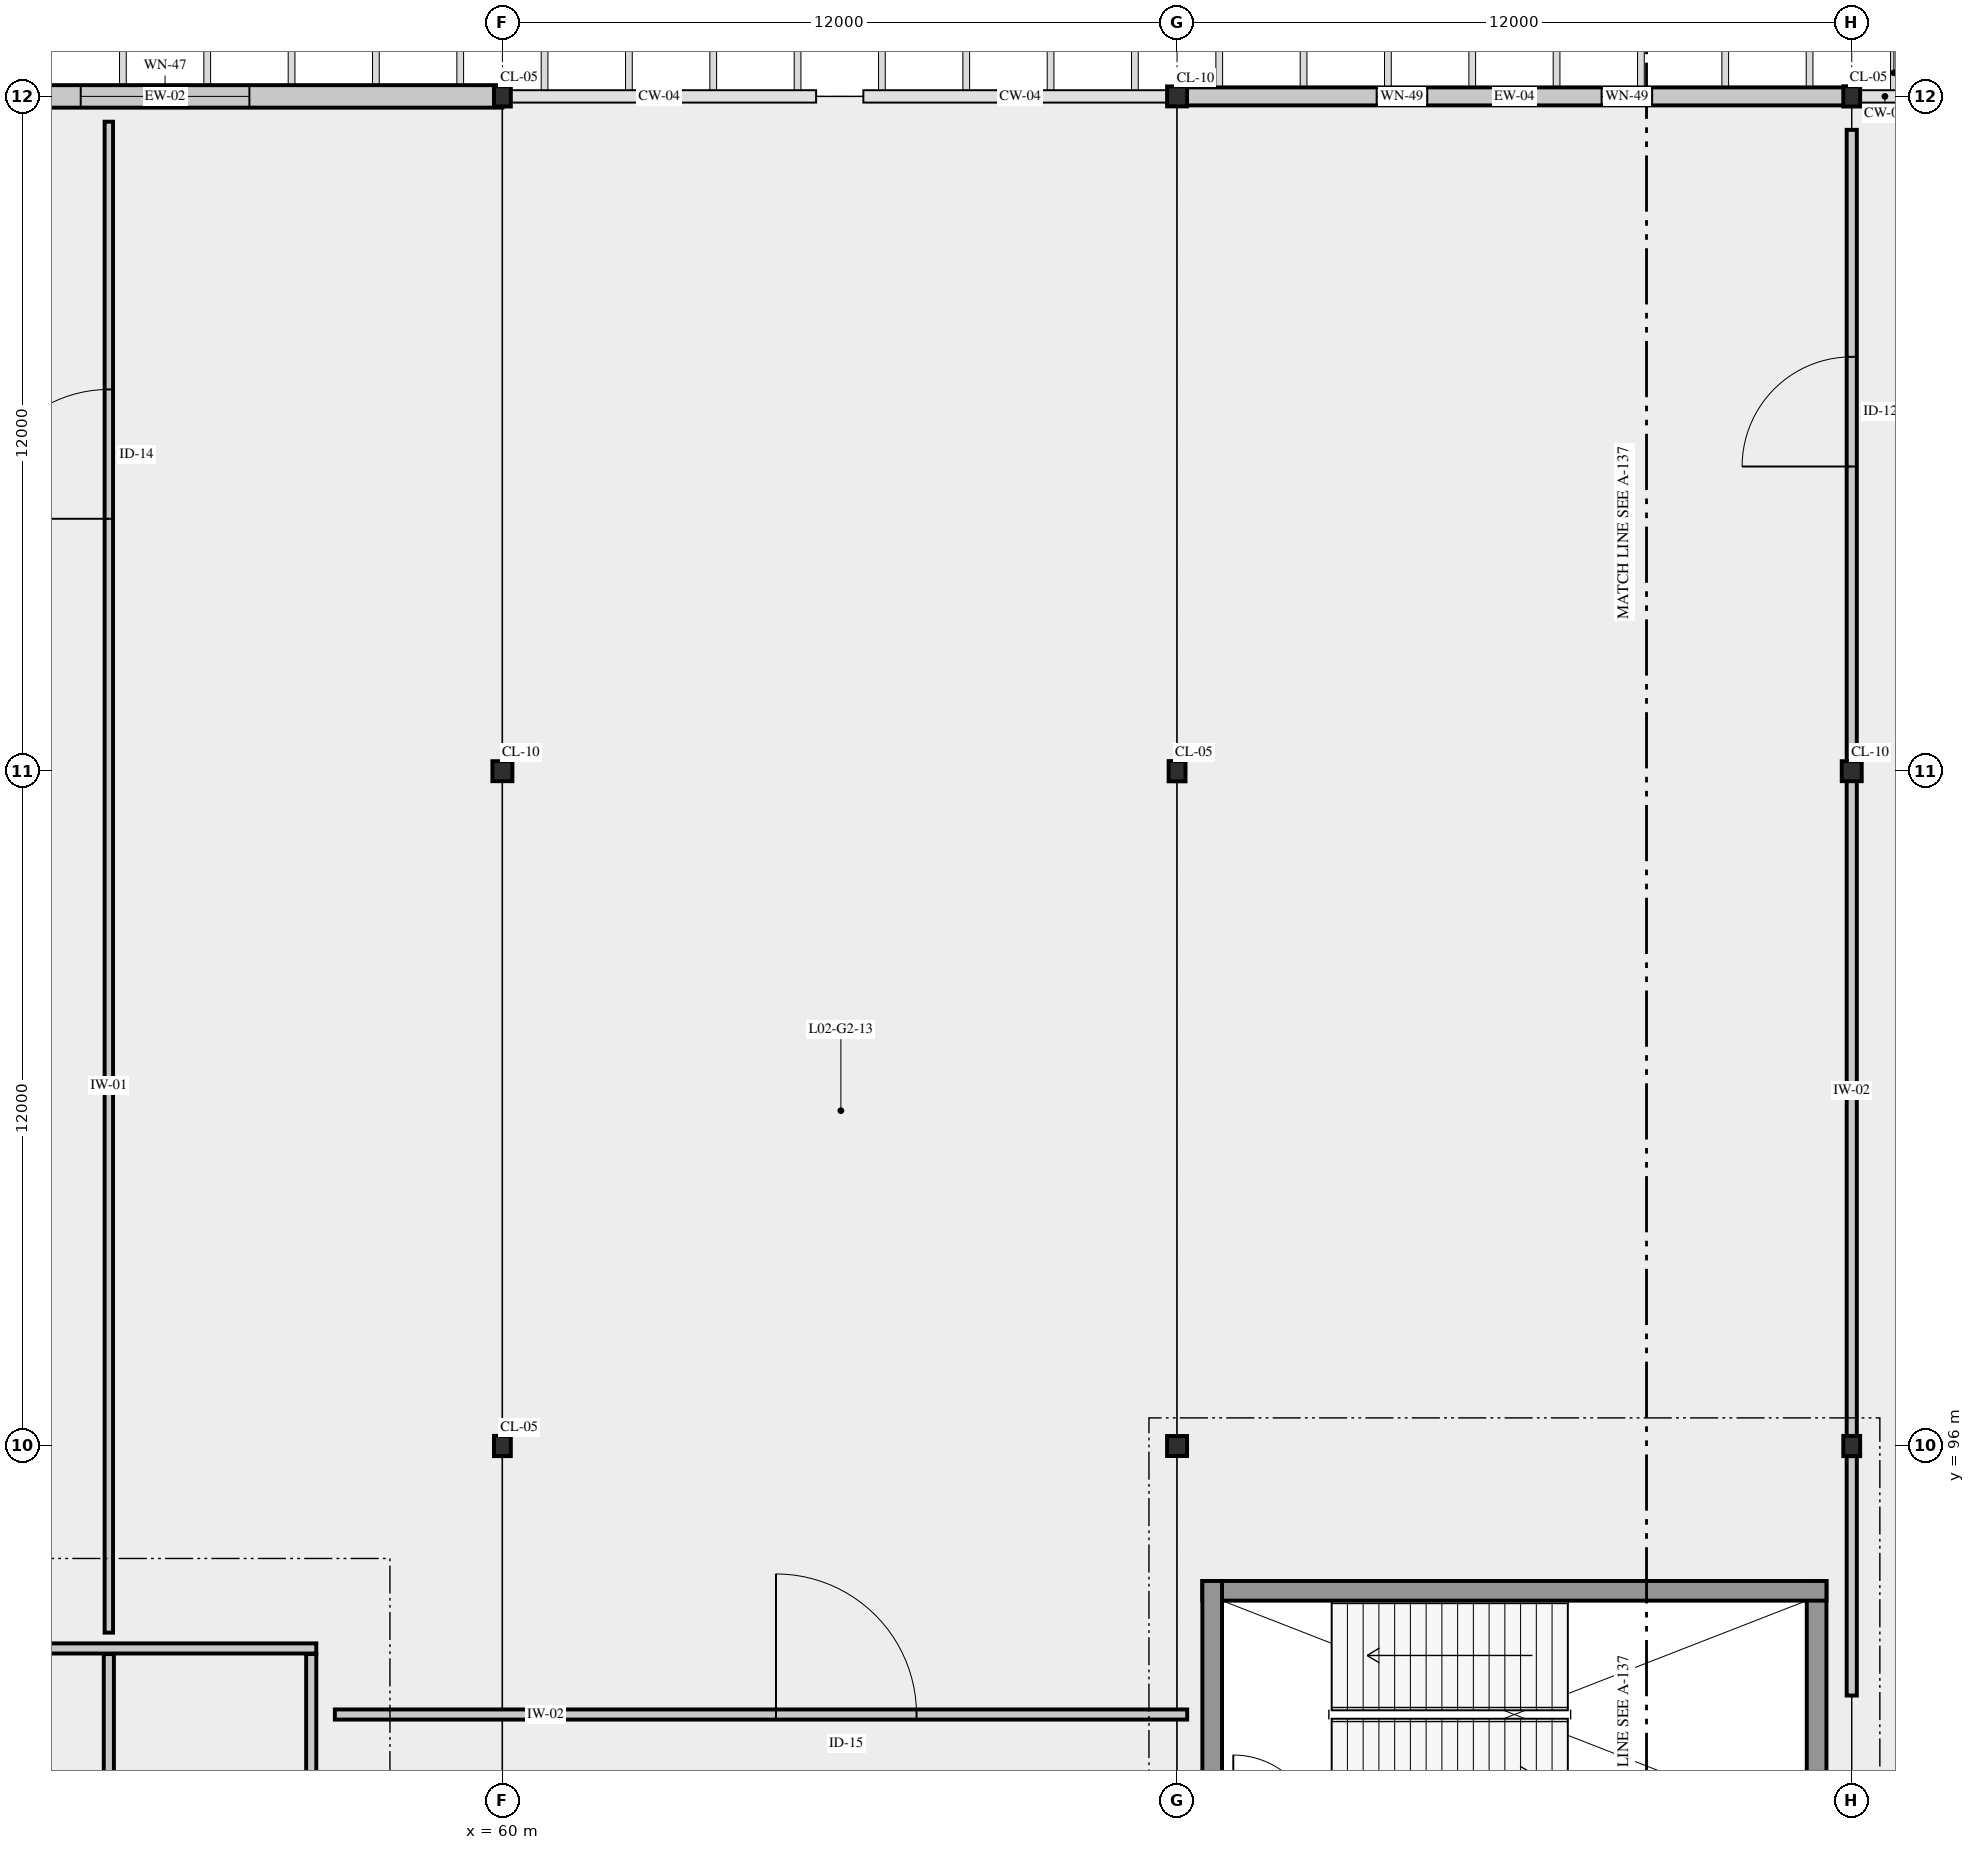
"""IFC4 building model, lengths in metres.
Left out: names, types, materials, properties, quantities, classifications, styles, units other than length and angle.
Written with IfcOpenShell. Run it as: python <this file> out.ifc"""

import sys

from ifc_helpers import new_model, si_unit, direction, frame, frame_2d, origin, origin_2d, place, context, subcontext, project, spatial, rectangle, hollow_circle, i_section, extrude, element, fill, save


model = new_model("IFC4")
c1 = context("Model", 3, precision=1e-05, world=origin(), true_north=direction((0.0, 1.0)))
c2 = subcontext(c1, "Body", "Model", "MODEL_VIEW")
j1 = project(units=[si_unit("LENGTHUNIT", "METRE"), si_unit("PLANEANGLEUNIT", "RADIAN")], contexts=[c1])
p1 = place(None, origin())
s1 = spatial("IfcSite", under=j1, at=p1, CompositionType="ELEMENT")
p2 = place(p1, origin())
s2 = spatial("IfcBuilding", under=s1, at=p2, CompositionType="ELEMENT")
p3 = place(p2, frame((0.0, 0.0, 10.8)))
s3 = spatial("IfcBuildingStorey", under=s2, at=p3, CompositionType="ELEMENT", Elevation=10.8)
p4 = place(p3, frame((60.0, 96.0, 0.0), z_axis=(0.0, 0.0, 1.0), x_axis=(1.0, 0.0, 0.0)))
e1 = element("IfcColumn", 1, at=p4, inside=s3, PredefinedType="COLUMN", context=c2, shape_type="SweptSolid", body=[
    extrude(i_section(OverallWidth=0.3, OverallDepth=0.36, WebThickness=0.012, FlangeThickness=0.022, FilletRadius=0.027, at=origin_2d()), origin(), (0.0, 0.0, 1.0), 6.0),
])
p5 = place(p3, frame((60.0, 108.0, 0.0), z_axis=(0.0, 0.0, 1.0), x_axis=(1.0, 0.0, 0.0)))
e2 = element("IfcColumn", 2, at=p5, inside=s3, PredefinedType="COLUMN", context=c2, shape_type="SweptSolid", body=[
    extrude(hollow_circle(Radius=0.178, WallThickness=0.016, at=origin_2d()), origin(), (0.0, 0.0, 1.0), 6.0),
])
p6 = place(p3, frame((60.0, 120.0, 0.0), z_axis=(0.0, 0.0, 1.0), x_axis=(1.0, 0.0, 0.0)))
e3 = element("IfcColumn", 3, at=p6, inside=s3, PredefinedType="COLUMN", context=c2, shape_type="SweptSolid", body=[
    extrude(i_section(OverallWidth=0.3, OverallDepth=0.36, WebThickness=0.012, FlangeThickness=0.022, FilletRadius=0.027, at=origin_2d()), origin(), (0.0, 0.0, 1.0), 6.0),
])
p7 = place(p3, frame((72.0, 96.0, 0.0), z_axis=(0.0, 0.0, 1.0), x_axis=(1.0, 0.0, 0.0)))
e4 = element("IfcColumn", 4, at=p7, inside=s3, PredefinedType="COLUMN", context=c2, shape_type="SweptSolid", body=[
    extrude(hollow_circle(Radius=0.178, WallThickness=0.016, at=origin_2d()), origin(), (0.0, 0.0, 1.0), 6.0),
])
p8 = place(p3, frame((72.0, 108.0, 0.0), z_axis=(0.0, 0.0, 1.0), x_axis=(1.0, 0.0, 0.0)))
e5 = element("IfcColumn", 5, at=p8, inside=s3, PredefinedType="COLUMN", context=c2, shape_type="SweptSolid", body=[
    extrude(i_section(OverallWidth=0.3, OverallDepth=0.36, WebThickness=0.012, FlangeThickness=0.022, FilletRadius=0.027, at=origin_2d()), origin(), (0.0, 0.0, 1.0), 6.0),
])
p9 = place(p3, frame((72.0, 120.0, 0.0), z_axis=(0.0, 0.0, 1.0), x_axis=(1.0, 0.0, 0.0)))
e6 = element("IfcColumn", 6, at=p9, inside=s3, PredefinedType="COLUMN", context=c2, shape_type="SweptSolid", body=[
    extrude(hollow_circle(Radius=0.178, WallThickness=0.016, at=origin_2d()), origin(), (0.0, 0.0, 1.0), 6.0),
])
p10 = place(p3, frame((84.0, 96.0, 0.0), z_axis=(0.0, 0.0, 1.0), x_axis=(1.0, 0.0, 0.0)))
e7 = element("IfcColumn", 7, at=p10, inside=s3, PredefinedType="COLUMN", context=c2, shape_type="SweptSolid", body=[
    extrude(i_section(OverallWidth=0.3, OverallDepth=0.36, WebThickness=0.012, FlangeThickness=0.022, FilletRadius=0.027, at=origin_2d()), origin(), (0.0, 0.0, 1.0), 6.0),
])
p11 = place(p3, frame((84.0, 108.0, 0.0), z_axis=(0.0, 0.0, 1.0), x_axis=(1.0, 0.0, 0.0)))
e8 = element("IfcColumn", 8, at=p11, inside=s3, PredefinedType="COLUMN", context=c2, shape_type="SweptSolid", body=[
    extrude(hollow_circle(Radius=0.178, WallThickness=0.016, at=origin_2d()), origin(), (0.0, 0.0, 1.0), 6.0),
])
p12 = place(p3, frame((84.0, 120.0, 0.0), z_axis=(0.0, 0.0, 1.0), x_axis=(1.0, 0.0, 0.0)))
e9 = element("IfcColumn", 9, at=p12, inside=s3, PredefinedType="COLUMN", context=c2, shape_type="SweptSolid", body=[
    extrude(i_section(OverallWidth=0.3, OverallDepth=0.36, WebThickness=0.012, FlangeThickness=0.022, FilletRadius=0.027, at=origin_2d()), origin(), (0.0, 0.0, 1.0), 6.0),
])
p13 = place(p3, frame((60.0, 120.0, 0.0), z_axis=(0.0, 0.0, 1.0), x_axis=(-1.0, 0.0, 0.0)))
e10 = element("IfcWall", 10, at=p13, inside=s3, PredefinedType="SOLIDWALL", context=c2, shape_type="SweptSolid", body=[
    extrude(rectangle(XDim=12.0, YDim=0.4, at=frame_2d((6.0, 0.0))), origin(), (0.0, 0.0, 1.0), 5.11),
])
p14 = place(p13, frame((4.5, 0.0, 0.95)))
e11 = element("IfcOpeningElement", 11, at=p14, cuts=e10, PredefinedType="OPENING", context=c2, shape_type="SweptSolid", body=[
    extrude(rectangle(XDim=3.0, YDim=2.4, at=frame_2d((1.5, 1.2))), frame((0.0, 0.21, 0.0), z_axis=(0.0, -1.0, 0.0), x_axis=(1.0, 0.0, 0.0)), (0.0, 0.0, 1.0), 0.42),
])
p15 = place(p3, frame((84.0, 120.0, 0.0), z_axis=(0.0, 0.0, 1.0), x_axis=(-1.0, 0.0, 0.0)))
e12 = element("IfcWall", 12, at=p15, inside=s3, PredefinedType="SOLIDWALL", context=c2, shape_type="SweptSolid", body=[
    extrude(rectangle(XDim=12.0, YDim=0.32, at=frame_2d((6.0, 0.0))), origin(), (0.0, 0.0, 1.0), 5.11),
])
p16 = place(p15, frame((3.55, 0.0, 0.95)))
e13 = element("IfcOpeningElement", 13, at=p16, cuts=e12, PredefinedType="OPENING", context=c2, shape_type="SweptSolid", body=[
    extrude(rectangle(XDim=0.9, YDim=2.7, at=frame_2d((0.45, 1.35))), frame((0.0, 0.17, 0.0), z_axis=(0.0, -1.0, 0.0), x_axis=(1.0, 0.0, 0.0)), (0.0, 0.0, 1.0), 0.34),
])
p17 = place(p15, frame((7.55, 0.0, 0.95)))
e14 = element("IfcOpeningElement", 14, at=p17, cuts=e12, PredefinedType="OPENING", context=c2, shape_type="SweptSolid", body=[
    extrude(rectangle(XDim=0.9, YDim=2.7, at=frame_2d((0.45, 1.35))), frame((0.0, 0.17, 0.0), z_axis=(0.0, -1.0, 0.0), x_axis=(1.0, 0.0, 0.0)), (0.0, 0.0, 1.0), 0.34),
])
p18 = place(p3, frame((83.375, 88.85, 0.0), z_axis=(0.0, 0.0, 1.0), x_axis=(0.0, 1.0, 0.0)))
e15 = element("IfcWall", 15, at=p18, inside=s3, PredefinedType="SHEAR", context=c2, shape_type="SweptSolid", body=[
    extrude(rectangle(XDim=4.75, YDim=0.35, at=frame_2d((2.375, 0.0))), origin(), (0.0, 0.0, 1.0), 5.69),
])
p19 = place(p3, frame((83.55, 93.425, 0.0), z_axis=(0.0, 0.0, 1.0), x_axis=(-1.0, 0.0, 0.0)))
e16 = element("IfcWall", 16, at=p19, inside=s3, PredefinedType="SHEAR", context=c2, shape_type="SweptSolid", body=[
    extrude(rectangle(XDim=11.1, YDim=0.35, at=frame_2d((5.55, 0.0))), origin(), (0.0, 0.0, 1.0), 5.69),
])
p20 = place(p3, frame((72.625, 93.6, 0.0), z_axis=(0.0, 0.0, 1.0), x_axis=(0.0, -1.0, 0.0)))
e17 = element("IfcWall", 17, at=p20, inside=s3, PredefinedType="SHEAR", context=c2, shape_type="SweptSolid", body=[
    extrude(rectangle(XDim=4.75, YDim=0.35, at=frame_2d((2.375, 0.0))), origin(), (0.0, 0.0, 1.0), 5.69),
])
p21 = place(p3, frame((49.31, 92.4, 0.0), z_axis=(0.0, 0.0, 1.0), x_axis=(1.0, 0.0, 0.0)))
e18 = element("IfcWall", 18, at=p21, inside=s3, PredefinedType="PARTITIONING", context=c2, shape_type="SweptSolid", body=[
    extrude(rectangle(XDim=7.38, YDim=0.18, at=frame_2d((3.69, 0.0))), origin(), (0.0, 0.0, 1.0), 5.27),
])
for number, where, z_axis, x_axis in (
    (19, (56.6, 88.9, 0.0), (0.0, 0.0, 1.0), (0.0, 1.0, 0.0)),
    (20, (53.0, 88.9, 0.0), (0.0, 0.0, 1.0), (0.0, 1.0, 0.0)),
):
    element("IfcWall", number, at=place(p3, frame(where, z_axis=z_axis, x_axis=x_axis)), inside=s3, PredefinedType="PARTITIONING", context=c2, shape_type="SweptSolid", body=[
        extrude(rectangle(XDim=3.4, YDim=0.18, at=frame_2d((1.7, 0.0))), origin(), (0.0, 0.0, 1.0), 5.27),
    ])
p22 = place(p3, frame((53.0, 92.681, 0.0), z_axis=(0.0, 0.0, 1.0), x_axis=(0.0, 1.0, 0.0)))
e21 = element("IfcWall", 21, at=p22, inside=s3, PredefinedType="PARTITIONING", context=c2, shape_type="SweptSolid", body=[
    extrude(rectangle(XDim=26.869, YDim=0.15, at=frame_2d((13.435, 0.0))), origin(), (0.0, 0.0, 1.0), 5.18),
])
p23 = place(p22, frame((19.808, 0.0, 0.0)))
e22 = element("IfcOpeningElement", 22, at=p23, cuts=e21, PredefinedType="OPENING", context=c2, shape_type="SweptSolid", body=[
    extrude(rectangle(XDim=2.3, YDim=2.6, at=frame_2d((1.15, 1.3))), frame((0.0, 0.085, 0.0), z_axis=(0.0, -1.0, 0.0), x_axis=(1.0, 0.0, 0.0)), (0.0, 0.0, 1.0), 0.17),
])
p24 = place(p3, frame((57.02, 91.225, 0.0), z_axis=(0.0, 0.0, 1.0), x_axis=(1.0, 0.0, 0.0)))
e23 = element("IfcWall", 23, at=p24, inside=s3, PredefinedType="PARTITIONING", context=c2, shape_type="SweptSolid", body=[
    extrude(rectangle(XDim=15.16, YDim=0.18, at=frame_2d((7.58, 0.0))), origin(), (0.0, 0.0, 1.0), 5.18),
])
p25 = place(p24, frame((7.846, 0.0, 0.0)))
e24 = element("IfcOpeningElement", 24, at=p25, cuts=e23, PredefinedType="OPENING", context=c2, shape_type="SweptSolid", body=[
    extrude(rectangle(XDim=2.5, YDim=2.75, at=frame_2d((1.25, 1.375))), frame((0.0, 0.1, 0.0), z_axis=(0.0, -1.0, 0.0), x_axis=(1.0, 0.0, 0.0)), (0.0, 0.0, 1.0), 0.2),
])
p26 = place(p3, frame((84.0, 91.562, 0.0), z_axis=(0.0, 0.0, 1.0), x_axis=(0.0, 1.0, 0.0)))
e25 = element("IfcWall", 25, at=p26, inside=s3, PredefinedType="PARTITIONING", context=c2, shape_type="SweptSolid", body=[
    extrude(rectangle(XDim=27.843, YDim=0.18, at=frame_2d((13.921, 0.0))), origin(), (0.0, 0.0, 1.0), 5.18),
])
p27 = place(p26, frame((21.856, 0.0, 0.0)))
e26 = element("IfcOpeningElement", 26, at=p27, cuts=e25, PredefinedType="OPENING", context=c2, shape_type="SweptSolid", body=[
    extrude(rectangle(XDim=1.95, YDim=2.45, at=frame_2d((0.975, 1.225))), frame((0.0, 0.1, 0.0), z_axis=(0.0, -1.0, 0.0), x_axis=(1.0, 0.0, 0.0)), (0.0, 0.0, 1.0), 0.2),
])
p28 = place(p14, origin())
e27 = element("IfcWindow", 27, at=p28, inside=s3, PartitioningType="SINGLE_PANEL", PredefinedType="WINDOW", context=c2, shape_type="SweptSolid", body=[
    extrude(rectangle(XDim=3.0, YDim=2.4, at=frame_2d((1.5, 1.2))), frame((0.0, 0.03, 0.0), z_axis=(0.0, -1.0, 0.0), x_axis=(1.0, 0.0, 0.0)), (0.0, 0.0, 1.0), 0.06),
])
fill(e11, e27)
p29 = place(p16, origin())
e28 = element("IfcWindow", 28, at=p29, inside=s3, PartitioningType="SINGLE_PANEL", PredefinedType="WINDOW", context=c2, shape_type="SweptSolid", body=[
    extrude(rectangle(XDim=0.9, YDim=2.7, at=frame_2d((0.45, 1.35))), frame((0.0, 0.03, 0.0), z_axis=(0.0, -1.0, 0.0), x_axis=(1.0, 0.0, 0.0)), (0.0, 0.0, 1.0), 0.06),
])
fill(e13, e28)
p30 = place(p17, origin())
e29 = element("IfcWindow", 29, at=p30, inside=s3, PartitioningType="SINGLE_PANEL", PredefinedType="WINDOW", context=c2, shape_type="SweptSolid", body=[
    extrude(rectangle(XDim=0.9, YDim=2.7, at=frame_2d((0.45, 1.35))), frame((0.0, 0.03, 0.0), z_axis=(0.0, -1.0, 0.0), x_axis=(1.0, 0.0, 0.0)), (0.0, 0.0, 1.0), 0.06),
])
fill(e14, e29)
p31 = place(p23, origin())
e30 = element("IfcDoor", 30, at=p31, inside=s3, OperationType="DOUBLE_DOOR_SINGLE_SWING", PredefinedType="DOOR", context=c2, shape_type="SweptSolid", body=[
    extrude(rectangle(XDim=2.3, YDim=2.6, at=frame_2d((1.15, 1.3))), frame((0.0, 0.025, 0.0), z_axis=(0.0, -1.0, 0.0), x_axis=(1.0, 0.0, 0.0)), (0.0, 0.0, 1.0), 0.05),
])
fill(e22, e30)
p32 = place(p25, origin())
e31 = element("IfcDoor", 31, at=p32, inside=s3, OperationType="DOUBLE_DOOR_SINGLE_SWING", PredefinedType="DOOR", context=c2, shape_type="SweptSolid", body=[
    extrude(rectangle(XDim=2.5, YDim=2.75, at=frame_2d((1.25, 1.375))), frame((0.0, 0.025, 0.0), z_axis=(0.0, -1.0, 0.0), x_axis=(1.0, 0.0, 0.0)), (0.0, 0.0, 1.0), 0.05),
])
fill(e24, e31)
p33 = place(p27, origin())
e32 = element("IfcDoor", 32, at=p33, inside=s3, OperationType="DOUBLE_DOOR_SINGLE_SWING", PredefinedType="DOOR", context=c2, shape_type="SweptSolid", body=[
    extrude(rectangle(XDim=1.95, YDim=2.45, at=frame_2d((0.975, 1.225))), frame((0.0, 0.025, 0.0), z_axis=(0.0, -1.0, 0.0), x_axis=(1.0, 0.0, 0.0)), (0.0, 0.0, 1.0), 0.05),
])
fill(e26, e32)
save(model, sys.argv[1])
